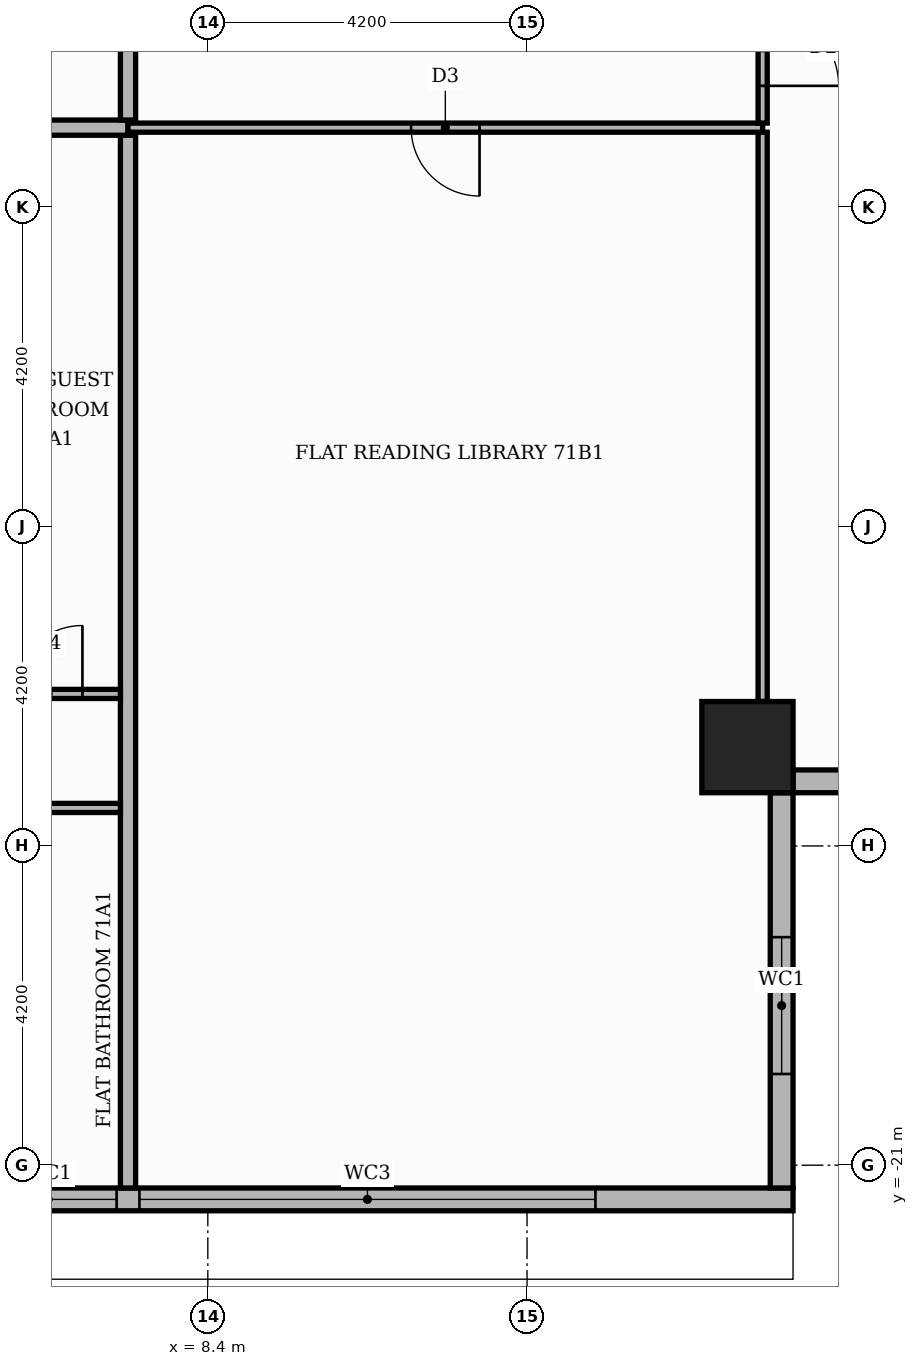
"""IFC4 building model, lengths in metres.
Left out: names, types, materials, properties, quantities, classifications, styles, units other than length and angle.
Written with IfcOpenShell. Run it as: python <this file> out.ifc"""

import sys

from ifc_helpers import new_model, si_unit, direction, frame, frame_2d, origin, origin_2d, place, context, subcontext, project, spatial, rectangle, extrude, element, fill, save


model = new_model("IFC4")
c1 = context("Model", 3, precision=1e-05, world=origin(), true_north=direction((0.0, 1.0)))
c2 = subcontext(c1, "Body", "Model", "MODEL_VIEW")
j1 = project(units=[si_unit("LENGTHUNIT", "METRE"), si_unit("PLANEANGLEUNIT", "RADIAN")], contexts=[c1])
p1 = place(None, origin())
s1 = spatial("IfcSite", under=j1, at=p1, CompositionType="ELEMENT")
p2 = place(p1, origin())
s2 = spatial("IfcBuilding", under=s1, at=p2, CompositionType="ELEMENT")
p3 = place(p2, frame((0.0, 0.0, 296.7)))
s3 = spatial("IfcBuildingStorey", under=s2, at=p3, CompositionType="ELEMENT", Elevation=296.7)
p4 = place(p3, frame((15.5, -15.5, 0.0), z_axis=(0.0, 0.0, 1.0), x_axis=(1.0, 0.0, 0.0)))
e1 = element("IfcColumn", 1, at=p4, inside=s3, PredefinedType="COLUMN", context=c2, shape_type="SweptSolid", body=[
    extrude(rectangle(XDim=1.2, YDim=1.2, at=origin_2d()), origin(), (0.0, 0.0, 1.0), 3.9),
])
p5 = place(p3, frame((-15.8, -21.45, 0.0), z_axis=(0.0, 0.0, 1.0), x_axis=(1.0, 0.0, 0.0)))
e2 = element("IfcWall", 2, at=p5, inside=s3, PredefinedType="STANDARD", context=c2, shape_type="SweptSolid", body=[
    extrude(rectangle(XDim=31.9, YDim=0.3, at=frame_2d((15.95, 0.0))), origin(), (0.0, 0.0, 1.0), 3.55),
])
p6 = place(p5, frame((0.2, 0.0, 0.6)))
e3 = element("IfcOpeningElement", 3, at=p6, cuts=e2, PredefinedType="OPENING", context=c2, shape_type="SweptSolid", body=[
    extrude(rectangle(XDim=6.0, YDim=2.4, at=frame_2d((3.0, 1.2))), frame((0.0, 0.16, 0.0), z_axis=(0.0, -1.0, 0.0), x_axis=(1.0, 0.0, 0.0)), (0.0, 0.0, 1.0), 0.32),
])
p7 = place(p5, frame((6.5, 0.0, 0.6)))
e4 = element("IfcOpeningElement", 4, at=p7, cuts=e2, PredefinedType="OPENING", context=c2, shape_type="SweptSolid", body=[
    extrude(rectangle(XDim=3.9, YDim=2.4, at=frame_2d((1.95, 1.2))), frame((0.0, 0.16, 0.0), z_axis=(0.0, -1.0, 0.0), x_axis=(1.0, 0.0, 0.0)), (0.0, 0.0, 1.0), 0.32),
])
p8 = place(p5, frame((10.7, 0.0, 0.6)))
e5 = element("IfcOpeningElement", 5, at=p8, cuts=e2, PredefinedType="OPENING", context=c2, shape_type="SweptSolid", body=[
    extrude(rectangle(XDim=3.9, YDim=2.4, at=frame_2d((1.95, 1.2))), frame((0.0, 0.16, 0.0), z_axis=(0.0, -1.0, 0.0), x_axis=(1.0, 0.0, 0.0)), (0.0, 0.0, 1.0), 0.32),
])
p9 = place(p5, frame((14.9, 0.0, 0.6)))
e6 = element("IfcOpeningElement", 6, at=p9, cuts=e2, PredefinedType="OPENING", context=c2, shape_type="SweptSolid", body=[
    extrude(rectangle(XDim=3.9, YDim=2.4, at=frame_2d((1.95, 1.2))), frame((0.0, 0.16, 0.0), z_axis=(0.0, -1.0, 0.0), x_axis=(1.0, 0.0, 0.0)), (0.0, 0.0, 1.0), 0.32),
])
p10 = place(p5, frame((19.1, 0.0, 0.6)))
e7 = element("IfcOpeningElement", 7, at=p10, cuts=e2, PredefinedType="OPENING", context=c2, shape_type="SweptSolid", body=[
    extrude(rectangle(XDim=1.8, YDim=2.4, at=frame_2d((0.9, 1.2))), frame((0.0, 0.16, 0.0), z_axis=(0.0, -1.0, 0.0), x_axis=(1.0, 0.0, 0.0)), (0.0, 0.0, 1.0), 0.32),
])
p11 = place(p5, frame((21.2, 0.0, 0.6)))
e8 = element("IfcOpeningElement", 8, at=p11, cuts=e2, PredefinedType="OPENING", context=c2, shape_type="SweptSolid", body=[
    extrude(rectangle(XDim=1.8, YDim=2.4, at=frame_2d((0.9, 1.2))), frame((0.0, 0.16, 0.0), z_axis=(0.0, -1.0, 0.0), x_axis=(1.0, 0.0, 0.0)), (0.0, 0.0, 1.0), 0.32),
])
p12 = place(p5, frame((23.3, 0.0, 0.6)))
e9 = element("IfcOpeningElement", 9, at=p12, cuts=e2, PredefinedType="OPENING", context=c2, shape_type="SweptSolid", body=[
    extrude(rectangle(XDim=6.0, YDim=2.4, at=frame_2d((3.0, 1.2))), frame((0.0, 0.16, 0.0), z_axis=(0.0, -1.0, 0.0), x_axis=(1.0, 0.0, 0.0)), (0.0, 0.0, 1.0), 0.32),
])
p13 = place(p3, frame((15.95, -21.3, 0.0), z_axis=(0.0, 0.0, 1.0), x_axis=(0.0, 1.0, 0.0)))
e10 = element("IfcWall", 10, at=p13, inside=s3, PredefinedType="STANDARD", context=c2, shape_type="SweptSolid", body=[
    extrude(rectangle(XDim=5.2, YDim=0.3, at=frame_2d((2.6, 0.0))), origin(), (0.0, 0.0, 1.0), 3.55),
])
p14 = place(p13, frame((1.5, 0.0, 0.6)))
e11 = element("IfcOpeningElement", 11, at=p14, cuts=e10, PredefinedType="OPENING", context=c2, shape_type="SweptSolid", body=[
    extrude(rectangle(XDim=1.8, YDim=2.4, at=frame_2d((0.9, 1.2))), frame((0.0, 0.16, 0.0), z_axis=(0.0, -1.0, 0.0), x_axis=(1.0, 0.0, 0.0)), (0.0, 0.0, 1.0), 0.32),
])
p15 = place(p3, frame((16.1, -15.95, 0.0), z_axis=(0.0, 0.0, 1.0), x_axis=(1.0, 0.0, 0.0)))
e12 = element("IfcWall", 12, at=p15, inside=s3, PredefinedType="STANDARD", context=c2, shape_type="SweptSolid", body=[
    extrude(rectangle(XDim=5.5, YDim=0.3, at=frame_2d((2.75, 0.0))), origin(), (0.0, 0.0, 1.0), 3.55),
])
p16 = place(p15, frame((1.9, 0.0, 0.6)))
e13 = element("IfcOpeningElement", 13, at=p16, cuts=e12, PredefinedType="OPENING", context=c2, shape_type="SweptSolid", body=[
    extrude(rectangle(XDim=1.8, YDim=2.4, at=frame_2d((0.9, 1.2))), frame((0.0, 0.16, 0.0), z_axis=(0.0, -1.0, 0.0), x_axis=(1.0, 0.0, 0.0)), (0.0, 0.0, 1.0), 0.32),
])
p17 = place(p3, frame((7.35, -21.3, 0.0), z_axis=(0.0, 0.0, 1.0), x_axis=(0.0, 1.0, 0.0)))
e14 = element("IfcWall", 14, at=p17, inside=s3, PredefinedType="PARTITIONING", context=c2, shape_type="SweptSolid", body=[
    extrude(rectangle(XDim=13.85, YDim=0.2, at=frame_2d((6.925, 0.0))), origin(), (0.0, 0.0, 1.0), 3.55),
])
p18 = place(p3, frame((-15.8, -16.3, 0.0), z_axis=(0.0, 0.0, 1.0), x_axis=(1.0, 0.0, 0.0)))
e15 = element("IfcWall", 15, at=p18, inside=s3, PredefinedType="PARTITIONING", context=c2, shape_type="SweptSolid", body=[
    extrude(rectangle(XDim=23.05, YDim=0.12, at=frame_2d((11.525, 0.0))), origin(), (0.0, 0.0, 1.0), 3.55),
])
p19 = place(p18, frame((9.0, 0.0, 0.0)))
e16 = element("IfcOpeningElement", 16, at=p19, cuts=e15, PredefinedType="OPENING", context=c2, shape_type="SweptSolid", body=[
    extrude(rectangle(XDim=1.0, YDim=2.1, at=frame_2d((0.5, 1.05))), frame((0.0, 0.07, 0.0), z_axis=(0.0, -1.0, 0.0), x_axis=(1.0, 0.0, 0.0)), (0.0, 0.0, 1.0), 0.14),
])
p20 = place(p18, frame((12.15, 0.0, 0.0)))
e17 = element("IfcOpeningElement", 17, at=p20, cuts=e15, PredefinedType="OPENING", context=c2, shape_type="SweptSolid", body=[
    extrude(rectangle(XDim=1.0, YDim=2.1, at=frame_2d((0.5, 1.05))), frame((0.0, 0.07, 0.0), z_axis=(0.0, -1.0, 0.0), x_axis=(1.0, 0.0, 0.0)), (0.0, 0.0, 1.0), 0.14),
])
p21 = place(p18, frame((16.4, 0.0, 0.0)))
e18 = element("IfcOpeningElement", 18, at=p21, cuts=e15, PredefinedType="OPENING", context=c2, shape_type="SweptSolid", body=[
    extrude(rectangle(XDim=0.9, YDim=2.1, at=frame_2d((0.45, 1.05))), frame((0.0, 0.07, 0.0), z_axis=(0.0, -1.0, 0.0), x_axis=(1.0, 0.0, 0.0)), (0.0, 0.0, 1.0), 0.14),
])
p22 = place(p3, frame((15.7, -14.9, 0.0), z_axis=(0.0, 0.0, 1.0), x_axis=(0.0, 1.0, 0.0)))
e19 = element("IfcWall", 19, at=p22, inside=s3, PredefinedType="PARTITIONING", context=c2, shape_type="SweptSolid", body=[
    extrude(rectangle(XDim=7.49, YDim=0.12, at=frame_2d((3.745, 0.0))), origin(), (0.0, 0.0, 1.0), 3.55),
])
p23 = place(p3, frame((-1.05, -14.8, 0.0), z_axis=(0.0, 0.0, 1.0), x_axis=(1.0, 0.0, 0.0)))
e20 = element("IfcWall", 20, at=p23, inside=s3, PredefinedType="PARTITIONING", context=c2, shape_type="SweptSolid", body=[
    extrude(rectangle(XDim=8.3, YDim=0.12, at=frame_2d((4.15, 0.0))), origin(), (0.0, 0.0, 1.0), 3.55),
])
p24 = place(p23, frame((4.8, 0.0, 0.0)))
e21 = element("IfcOpeningElement", 21, at=p24, cuts=e20, PredefinedType="OPENING", context=c2, shape_type="SweptSolid", body=[
    extrude(rectangle(XDim=0.9, YDim=2.1, at=frame_2d((0.45, 1.05))), frame((0.0, 0.07, 0.0), z_axis=(0.0, -1.0, 0.0), x_axis=(1.0, 0.0, 0.0)), (0.0, 0.0, 1.0), 0.14),
])
p25 = place(p23, frame((6.9, 0.0, 0.0)))
e22 = element("IfcOpeningElement", 22, at=p25, cuts=e20, PredefinedType="OPENING", context=c2, shape_type="SweptSolid", body=[
    extrude(rectangle(XDim=0.9, YDim=2.1, at=frame_2d((0.45, 1.05))), frame((0.0, 0.07, 0.0), z_axis=(0.0, -1.0, 0.0), x_axis=(1.0, 0.0, 0.0)), (0.0, 0.0, 1.0), 0.14),
])
p26 = place(p3, frame((-21.3, -7.35, 0.0), z_axis=(0.0, 0.0, 1.0), x_axis=(1.0, 0.0, 0.0)))
e23 = element("IfcWall", 23, at=p26, inside=s3, PredefinedType="PARTITIONING", context=c2, shape_type="SweptSolid", body=[
    extrude(rectangle(XDim=28.65, YDim=0.2, at=frame_2d((14.325, 0.0))), origin(), (0.0, 0.0, 1.0), 3.55),
])
p27 = place(p26, frame((16.55, 0.0, 0.0)))
e24 = element("IfcOpeningElement", 24, at=p27, cuts=e23, PredefinedType="OPENING", context=c2, shape_type="SweptSolid", body=[
    extrude(rectangle(XDim=1.1, YDim=2.4, at=frame_2d((0.55, 1.2))), frame((0.0, 0.11, 0.0), z_axis=(0.0, -1.0, 0.0), x_axis=(1.0, 0.0, 0.0)), (0.0, 0.0, 1.0), 0.22),
])
p28 = place(p3, frame((7.35, -7.35, 0.0), z_axis=(0.0, 0.0, 1.0), x_axis=(1.0, 0.0, 0.0)))
e25 = element("IfcWall", 25, at=p28, inside=s3, PredefinedType="PARTITIONING", context=c2, shape_type="SweptSolid", body=[
    extrude(rectangle(XDim=8.35, YDim=0.12, at=frame_2d((4.175, 0.0))), origin(), (0.0, 0.0, 1.0), 3.55),
])
p29 = place(p28, frame((3.725, 0.0, 0.0)))
e26 = element("IfcOpeningElement", 26, at=p29, cuts=e25, PredefinedType="OPENING", context=c2, shape_type="SweptSolid", body=[
    extrude(rectangle(XDim=0.9, YDim=2.1, at=frame_2d((0.45, 1.05))), frame((0.0, 0.07, 0.0), z_axis=(0.0, -1.0, 0.0), x_axis=(1.0, 0.0, 0.0)), (0.0, 0.0, 1.0), 0.14),
])
p30 = place(p3, frame((15.7, -7.29, 0.0), z_axis=(0.0, 0.0, 1.0), x_axis=(0.0, 1.0, 0.0)))
e27 = element("IfcWall", 27, at=p30, inside=s3, PredefinedType="PARTITIONING", context=c2, shape_type="SweptSolid", body=[
    extrude(rectangle(XDim=1.98, YDim=0.12, at=frame_2d((0.99, 0.0))), origin(), (0.0, 0.0, 1.0), 3.55),
])
p31 = place(p30, frame((0.49, 0.0, 0.0)))
e28 = element("IfcOpeningElement", 28, at=p31, cuts=e27, PredefinedType="OPENING", context=c2, shape_type="SweptSolid", body=[
    extrude(rectangle(XDim=1.0, YDim=2.1, at=frame_2d((0.5, 1.05))), frame((0.0, 0.07, 0.0), z_axis=(0.0, -1.0, 0.0), x_axis=(1.0, 0.0, 0.0)), (0.0, 0.0, 1.0), 0.14),
])
p32 = place(p3, frame((7.35, -7.25, 0.0), z_axis=(0.0, 0.0, 1.0), x_axis=(0.0, 1.0, 0.0)))
e29 = element("IfcWall", 29, at=p32, inside=s3, PredefinedType="PARTITIONING", context=c2, shape_type="SweptSolid", body=[
    extrude(rectangle(XDim=14.5, YDim=0.2, at=frame_2d((7.25, 0.0))), origin(), (0.0, 0.0, 1.0), 3.55),
])
p33 = place(p32, frame((2.5, 0.0, 0.0)))
e30 = element("IfcOpeningElement", 30, at=p33, cuts=e29, PredefinedType="OPENING", context=c2, shape_type="SweptSolid", body=[
    extrude(rectangle(XDim=1.1, YDim=2.4, at=frame_2d((0.55, 1.2))), frame((0.0, 0.11, 0.0), z_axis=(0.0, -1.0, 0.0), x_axis=(1.0, 0.0, 0.0)), (0.0, 0.0, 1.0), 0.22),
])
p34 = place(p11, origin())
e31 = element("IfcWindow", 31, at=p34, inside=s3, PartitioningType="SINGLE_PANEL", PredefinedType="WINDOW", context=c2, shape_type="SweptSolid", body=[
    extrude(rectangle(XDim=1.8, YDim=2.4, at=frame_2d((0.9, 1.2))), frame((0.0, 0.03, 0.0), z_axis=(0.0, -1.0, 0.0), x_axis=(1.0, 0.0, 0.0)), (0.0, 0.0, 1.0), 0.06),
])
fill(e8, e31)
p35 = place(p12, origin())
e32 = element("IfcWindow", 32, at=p35, inside=s3, PartitioningType="SINGLE_PANEL", PredefinedType="WINDOW", context=c2, shape_type="SweptSolid", body=[
    extrude(rectangle(XDim=6.0, YDim=2.4, at=frame_2d((3.0, 1.2))), frame((0.0, 0.03, 0.0), z_axis=(0.0, -1.0, 0.0), x_axis=(1.0, 0.0, 0.0)), (0.0, 0.0, 1.0), 0.06),
])
fill(e9, e32)
p36 = place(p14, origin())
e33 = element("IfcWindow", 33, at=p36, inside=s3, PartitioningType="SINGLE_PANEL", PredefinedType="WINDOW", context=c2, shape_type="SweptSolid", body=[
    extrude(rectangle(XDim=1.8, YDim=2.4, at=frame_2d((0.9, 1.2))), frame((0.0, 0.03, 0.0), z_axis=(0.0, -1.0, 0.0), x_axis=(1.0, 0.0, 0.0)), (0.0, 0.0, 1.0), 0.06),
])
fill(e11, e33)
p37 = place(p25, origin())
e34 = element("IfcDoor", 34, at=p37, inside=s3, OperationType="SINGLE_SWING_RIGHT", PredefinedType="DOOR", context=c2, shape_type="SweptSolid", body=[
    extrude(rectangle(XDim=0.9, YDim=2.1, at=frame_2d((0.45, 1.05))), frame((0.0, 0.025, 0.0), z_axis=(0.0, -1.0, 0.0), x_axis=(1.0, 0.0, 0.0)), (0.0, 0.0, 1.0), 0.05),
])
fill(e22, e34)
p38 = place(p29, frame((0.9, 0.0, 0.0), z_axis=(0.0, 0.0, 1.0), x_axis=(-1.0, 0.0, 0.0)))
e35 = element("IfcDoor", 35, at=p38, inside=s3, OperationType="SINGLE_SWING_RIGHT", PredefinedType="DOOR", context=c2, shape_type="SweptSolid", body=[
    extrude(rectangle(XDim=0.9, YDim=2.1, at=frame_2d((0.45, 1.05))), frame((0.0, 0.025, 0.0), z_axis=(0.0, -1.0, 0.0), x_axis=(1.0, 0.0, 0.0)), (0.0, 0.0, 1.0), 0.05),
])
fill(e26, e35)
p39 = place(p31, frame((1.0, 0.0, 0.0), z_axis=(0.0, 0.0, 1.0), x_axis=(-1.0, 0.0, 0.0)))
e36 = element("IfcDoor", 36, at=p39, inside=s3, OperationType="SINGLE_SWING_LEFT", PredefinedType="DOOR", context=c2, shape_type="SweptSolid", body=[
    extrude(rectangle(XDim=1.0, YDim=2.1, at=frame_2d((0.5, 1.05))), frame((0.0, 0.025, 0.0), z_axis=(0.0, -1.0, 0.0), x_axis=(1.0, 0.0, 0.0)), (0.0, 0.0, 1.0), 0.05),
])
fill(e28, e36)
save(model, sys.argv[1])
